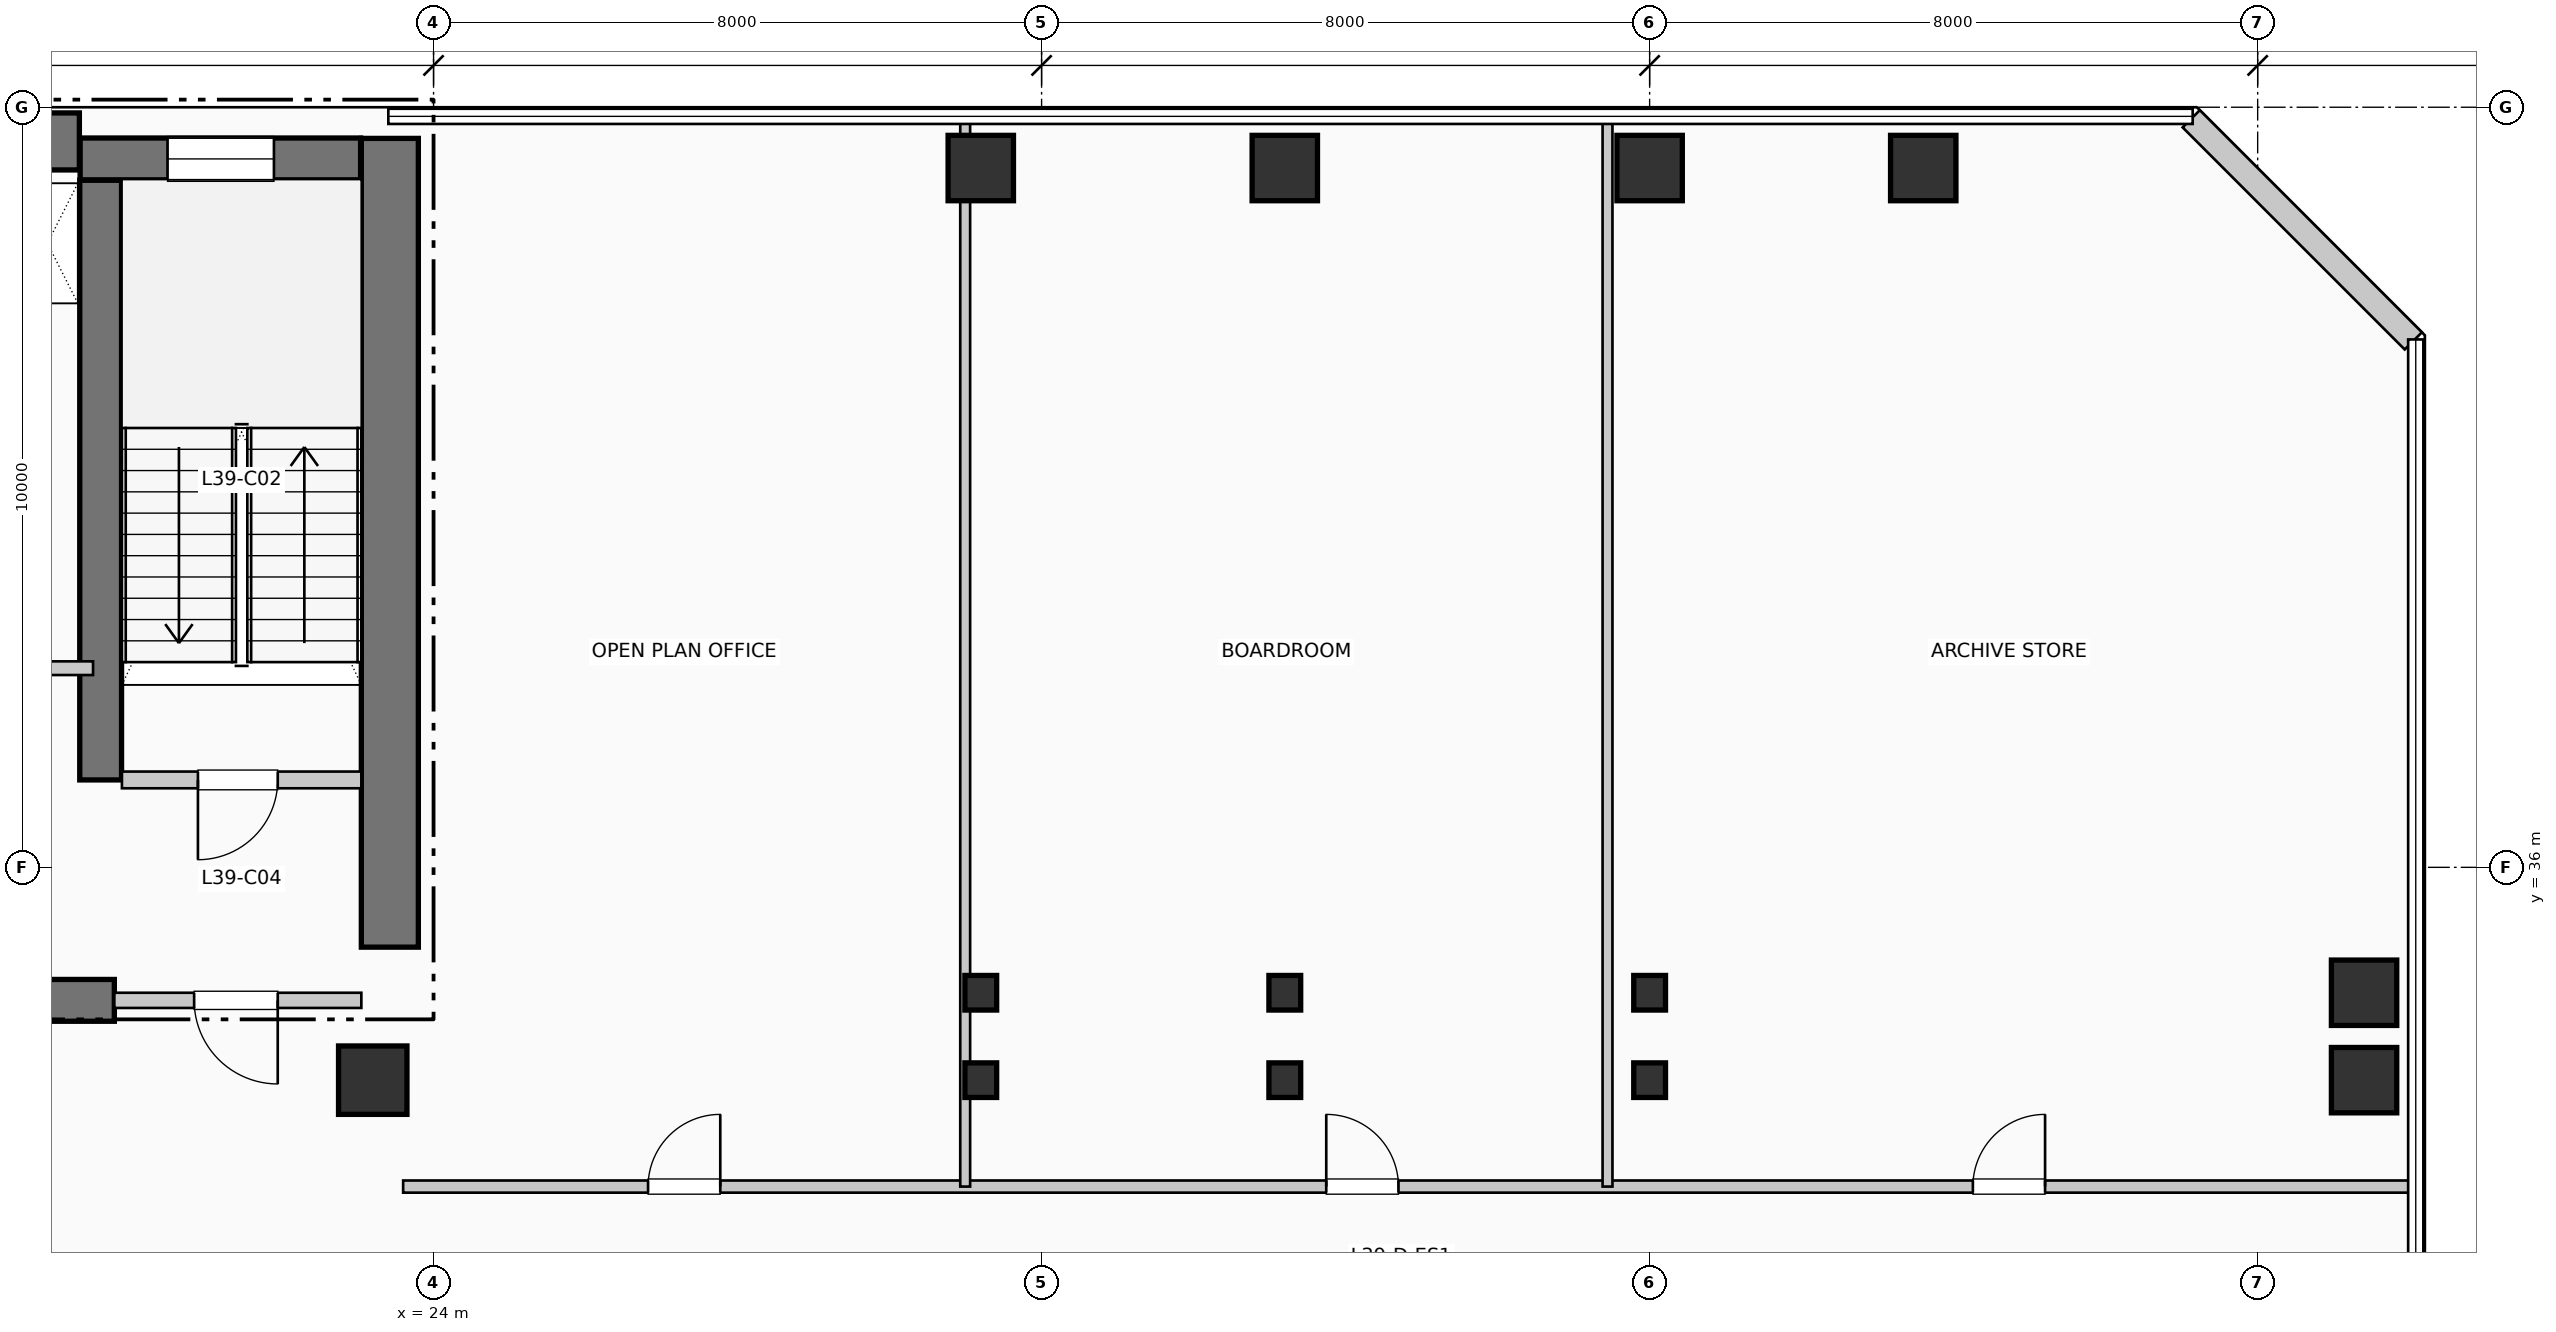
"""IFC4 building model, lengths in metres.
Left out: names, types, materials, properties, quantities, classifications, styles, units other than length and angle.
Written with IfcOpenShell. Run it as: python <this file> out.ifc"""

import sys

from ifc_helpers import new_model, si_unit, direction, frame, frame_2d, origin, origin_2d, place, context, subcontext, project, spatial, rectangle, i_section, extrude, element, fill, save


model = new_model("IFC4")
c1 = context("Model", 3, precision=1e-05, world=origin(), true_north=direction((0.0, 1.0)))
c2 = subcontext(c1, "Body", "Model", "MODEL_VIEW")
j1 = project(units=[si_unit("LENGTHUNIT", "METRE"), si_unit("PLANEANGLEUNIT", "RADIAN")], contexts=[c1])
p1 = place(None, origin())
s1 = spatial("IfcSite", under=j1, at=p1, CompositionType="ELEMENT")
p2 = place(p1, origin())
s2 = spatial("IfcBuilding", under=s1, at=p2, CompositionType="ELEMENT")
p3 = place(p2, frame((0.0, 0.0, 162.69)))
s3 = spatial("IfcBuildingStorey", under=s2, at=p3, CompositionType="ELEMENT", Elevation=162.69)
p4 = place(p3, frame((5.36, 45.55, 0.0), z_axis=(0.0, 0.0, 1.0), x_axis=(1.0, 0.0, 0.0)))
e1 = element("IfcWall", 1, at=p4, inside=s3, PredefinedType="SHEAR", context=c2, shape_type="SweptSolid", body=[
    extrude(rectangle(XDim=13.98, YDim=0.75, at=frame_2d((6.99, 0.0))), origin(), (0.0, 0.0, 1.0), 3.96),
])
p5 = place(p3, frame((23.425, 34.95, 0.0), z_axis=(0.0, 0.0, 1.0), x_axis=(0.0, 1.0, 0.0)))
e2 = element("IfcWall", 2, at=p5, inside=s3, PredefinedType="SHEAR", context=c2, shape_type="SweptSolid", body=[
    extrude(rectangle(XDim=10.64, YDim=0.75, at=frame_2d((5.32, 0.0))), origin(), (0.0, 0.0, 1.0), 3.96),
])
p6 = place(p3, frame((13.68, 34.25, 0.0), z_axis=(0.0, 0.0, 1.0), x_axis=(1.0, 0.0, 0.0)))
e3 = element("IfcWall", 3, at=p6, inside=s3, PredefinedType="SHEAR", context=c2, shape_type="SweptSolid", body=[
    extrude(rectangle(XDim=6.12, YDim=0.55, at=frame_2d((3.06, 0.0))), origin(), (0.0, 0.0, 1.0), 3.96),
])
p7 = place(p3, frame((19.62, 37.15, 0.0), z_axis=(0.0, 0.0, 1.0), x_axis=(0.0, 1.0, 0.0)))
e4 = element("IfcWall", 4, at=p7, inside=s3, PredefinedType="SHEAR", context=c2, shape_type="SweptSolid", body=[
    extrude(rectangle(XDim=7.89, YDim=0.55, at=frame_2d((3.945, 0.0))), origin(), (0.0, 0.0, 1.0), 3.96),
])
p8 = place(p3, frame((19.35, 45.32, 0.0), z_axis=(0.0, 0.0, 1.0), x_axis=(1.0, 0.0, 0.0)))
e5 = element("IfcWall", 5, at=p8, inside=s3, PredefinedType="SHEAR", context=c2, shape_type="SweptSolid", body=[
    extrude(rectangle(XDim=3.69, YDim=0.55, at=frame_2d((1.845, 0.0))), origin(), (0.0, 0.0, 1.0), 3.96),
])
p9 = place(p8, frame((1.15, 0.0, 1.05)))
e6 = element("IfcOpeningElement", 6, at=p9, cuts=e5, PredefinedType="OPENING", context=c2, shape_type="SweptSolid", body=[
    extrude(rectangle(XDim=1.4, YDim=1.8, at=frame_2d((0.7, 0.9))), frame((0.0, 0.285, 0.0), z_axis=(0.0, -1.0, 0.0), x_axis=(1.0, 0.0, 0.0)), (0.0, 0.0, 1.0), 0.57),
])
p10 = place(p3, frame((23.2, 33.2, 0.0), z_axis=(0.0, 0.0, 1.0), x_axis=(1.0, 0.0, 0.0)))
e7 = element("IfcColumn", 7, at=p10, inside=s3, PredefinedType="COLUMN", context=c2, shape_type="SweptSolid", body=[
    extrude(rectangle(XDim=0.9, YDim=0.9, at=origin_2d()), origin(), (0.0, 0.0, 1.0), 3.96),
])
for number, where, z_axis, x_axis in (
    (8, (31.2, 33.2, 0.0), (0.0, 0.0, 1.0), (1.0, 0.0, 0.0)),
    (9, (31.2, 34.35, 0.0), (0.0, 0.0, 1.0), (1.0, 0.0, 0.0)),
):
    element("IfcColumn", number, at=place(p3, frame(where, z_axis=z_axis, x_axis=x_axis)), inside=s3, PredefinedType="COLUMN", context=c2, shape_type="SweptSolid", body=[
        extrude(i_section(OverallWidth=0.418, OverallDepth=0.455, WebThickness=0.032, FlangeThickness=0.051, at=origin_2d()), origin(), (0.0, 0.0, 1.0), 3.96),
    ])
p11 = place(p3, frame((31.2, 45.2, 0.0), z_axis=(0.0, 0.0, 1.0), x_axis=(1.0, 0.0, 0.0)))
e10 = element("IfcColumn", 10, at=p11, inside=s3, PredefinedType="COLUMN", context=c2, shape_type="SweptSolid", body=[
    extrude(rectangle(XDim=0.86, YDim=0.86, at=origin_2d()), origin(), (0.0, 0.0, 1.0), 3.96),
])
for number, where, z_axis, x_axis in (
    (11, (35.2, 33.2, 0.0), (0.0, 0.0, 1.0), (1.0, 0.0, 0.0)),
    (12, (35.2, 34.35, 0.0), (0.0, 0.0, 1.0), (1.0, 0.0, 0.0)),
):
    element("IfcColumn", number, at=place(p3, frame(where, z_axis=z_axis, x_axis=x_axis)), inside=s3, PredefinedType="COLUMN", context=c2, shape_type="SweptSolid", body=[
        extrude(i_section(OverallWidth=0.418, OverallDepth=0.455, WebThickness=0.032, FlangeThickness=0.051, at=origin_2d()), origin(), (0.0, 0.0, 1.0), 3.96),
    ])
p12 = place(p3, frame((35.2, 45.2, 0.0), z_axis=(0.0, 0.0, 1.0), x_axis=(1.0, 0.0, 0.0)))
e13 = element("IfcColumn", 13, at=p12, inside=s3, PredefinedType="COLUMN", context=c2, shape_type="SweptSolid", body=[
    extrude(rectangle(XDim=0.86, YDim=0.86, at=origin_2d()), origin(), (0.0, 0.0, 1.0), 3.96),
])
for number, where, z_axis, x_axis in (
    (14, (40.0, 33.2, 0.0), (0.0, 0.0, 1.0), (1.0, 0.0, 0.0)),
    (15, (40.0, 34.35, 0.0), (0.0, 0.0, 1.0), (1.0, 0.0, 0.0)),
):
    element("IfcColumn", number, at=place(p3, frame(where, z_axis=z_axis, x_axis=x_axis)), inside=s3, PredefinedType="COLUMN", context=c2, shape_type="SweptSolid", body=[
        extrude(i_section(OverallWidth=0.418, OverallDepth=0.455, WebThickness=0.032, FlangeThickness=0.051, at=origin_2d()), origin(), (0.0, 0.0, 1.0), 3.96),
    ])
for number, where, z_axis, x_axis in (
    (16, (40.0, 45.2, 0.0), (0.0, 0.0, 1.0), (1.0, 0.0, 0.0)),
    (17, (43.6, 45.2, 0.0), (0.0, 0.0, 1.0), (1.0, 0.0, 0.0)),
    (18, (49.4, 33.2, 0.0), (0.0, 0.0, 1.0), (1.0, 0.0, 0.0)),
    (19, (49.4, 34.35, 0.0), (0.0, 0.0, 1.0), (1.0, 0.0, 0.0)),
):
    element("IfcColumn", number, at=place(p3, frame(where, z_axis=z_axis, x_axis=x_axis)), inside=s3, PredefinedType="COLUMN", context=c2, shape_type="SweptSolid", body=[
        extrude(rectangle(XDim=0.86, YDim=0.86, at=origin_2d()), origin(), (0.0, 0.0, 1.0), 3.96),
    ])
p13 = place(p3, frame((50.048, 42.926, 0.0), z_axis=(0.0, 0.0, 1.0), x_axis=(-0.707136318428, 0.707077242712, 0.0)))
e20 = element("IfcWall", 20, at=p13, inside=s3, PredefinedType="SOLIDWALL", context=c2, shape_type="SweptSolid", body=[
    extrude(rectangle(XDim=4.133, YDim=0.32, at=frame_2d((2.066, 0.0))), origin(), (0.0, 0.0, 1.0), 3.71),
])
p14 = place(p3, frame((19.9, 37.15, 0.0), z_axis=(0.0, 0.0, 1.0), x_axis=(1.0, 0.0, 0.0)))
e21 = element("IfcWall", 21, at=p14, inside=s3, PredefinedType="PARTITIONING", context=c2, shape_type="SweptSolid", body=[
    extrude(rectangle(XDim=3.15, YDim=0.22, at=frame_2d((1.575, 0.0))), origin(), (0.0, 0.0, 1.0), 3.71),
])
p15 = place(p14, frame((2.05, 0.0, 0.0), z_axis=(0.0, 0.0, 1.0), x_axis=(-1.0, 0.0, 0.0)))
e22 = element("IfcOpeningElement", 22, at=p15, cuts=e21, PredefinedType="OPENING", context=c2, shape_type="SweptSolid", body=[
    extrude(rectangle(XDim=1.05, YDim=2.15, at=frame_2d((0.525, 1.075))), frame((0.0, 0.12, 0.0), z_axis=(0.0, -1.0, 0.0), x_axis=(1.0, 0.0, 0.0)), (0.0, 0.0, 1.0), 0.24),
])
p16 = place(p3, frame((19.8, 34.25, 0.0), z_axis=(0.0, 0.0, 1.0), x_axis=(1.0, 0.0, 0.0)))
e23 = element("IfcWall", 23, at=p16, inside=s3, PredefinedType="PARTITIONING", context=c2, shape_type="SweptSolid", body=[
    extrude(rectangle(XDim=3.25, YDim=0.2, at=frame_2d((1.625, 0.0))), origin(), (0.0, 0.0, 1.0), 3.71),
])
p17 = place(p16, frame((2.15, 0.0, 0.0), z_axis=(0.0, 0.0, 1.0), x_axis=(-1.0, 0.0, 0.0)))
e24 = element("IfcOpeningElement", 24, at=p17, cuts=e23, PredefinedType="OPENING", context=c2, shape_type="SweptSolid", body=[
    extrude(rectangle(XDim=1.1, YDim=2.15, at=frame_2d((0.55, 1.075))), frame((0.0, 0.11, 0.0), z_axis=(0.0, -1.0, 0.0), x_axis=(1.0, 0.0, 0.0)), (0.0, 0.0, 1.0), 0.22),
])
p18 = place(p3, frame((17.68, 38.62, 0.0), z_axis=(0.0, 0.0, 1.0), x_axis=(1.0, 0.0, 0.0)))
e25 = element("IfcWall", 25, at=p18, inside=s3, PredefinedType="PARTITIONING", context=c2, shape_type="SweptSolid", body=[
    extrude(rectangle(XDim=1.84, YDim=0.18, at=frame_2d((0.92, 0.0))), origin(), (0.0, 0.0, 1.0), 3.71),
])
p19 = place(p18, frame((0.24, 0.0, 0.0)))
e26 = element("IfcOpeningElement", 26, at=p19, cuts=e25, PredefinedType="OPENING", context=c2, shape_type="SweptSolid", body=[
    extrude(rectangle(XDim=0.92, YDim=2.1, at=frame_2d((0.46, 1.05))), frame((0.0, 0.1, 0.0), z_axis=(0.0, -1.0, 0.0), x_axis=(1.0, 0.0, 0.0)), (0.0, 0.0, 1.0), 0.2),
])
p20 = place(p3, frame((23.6, 31.8, 0.0), z_axis=(0.0, 0.0, 1.0), x_axis=(1.0, 0.0, 0.0)))
e27 = element("IfcWall", 27, at=p20, inside=s3, PredefinedType="PARTITIONING", context=c2, shape_type="SweptSolid", body=[
    extrude(rectangle(XDim=26.41, YDim=0.16, at=frame_2d((13.205, 0.0))), origin(), (0.0, 0.0, 1.0), 3.71),
])
p21 = place(p20, frame((3.222, 0.0, 0.0)))
e28 = element("IfcOpeningElement", 28, at=p21, cuts=e27, PredefinedType="OPENING", context=c2, shape_type="SweptSolid", body=[
    extrude(rectangle(XDim=0.95, YDim=2.15, at=frame_2d((0.475, 1.075))), frame((0.0, 0.09, 0.0), z_axis=(0.0, -1.0, 0.0), x_axis=(1.0, 0.0, 0.0)), (0.0, 0.0, 1.0), 0.18),
])
p22 = place(p20, frame((12.146, 0.0, 0.0)))
e29 = element("IfcOpeningElement", 29, at=p22, cuts=e27, PredefinedType="OPENING", context=c2, shape_type="SweptSolid", body=[
    extrude(rectangle(XDim=0.95, YDim=2.15, at=frame_2d((0.475, 1.075))), frame((0.0, 0.09, 0.0), z_axis=(0.0, -1.0, 0.0), x_axis=(1.0, 0.0, 0.0)), (0.0, 0.0, 1.0), 0.18),
])
p23 = place(p20, frame((20.653, 0.0, 0.0)))
e30 = element("IfcOpeningElement", 30, at=p23, cuts=e27, PredefinedType="OPENING", context=c2, shape_type="SweptSolid", body=[
    extrude(rectangle(XDim=0.95, YDim=2.15, at=frame_2d((0.475, 1.075))), frame((0.0, 0.09, 0.0), z_axis=(0.0, -1.0, 0.0), x_axis=(1.0, 0.0, 0.0)), (0.0, 0.0, 1.0), 0.18),
])
p24 = place(p3, frame((30.995, 31.8, 0.0), z_axis=(0.0, 0.0, 1.0), x_axis=(0.0, 1.0, 0.0)))
e31 = element("IfcWall", 31, at=p24, inside=s3, PredefinedType="PARTITIONING", context=c2, shape_type="SweptSolid", body=[
    extrude(rectangle(XDim=14.01, YDim=0.13, at=frame_2d((7.005, 0.0))), origin(), (0.0, 0.0, 1.0), 3.045),
])
p25 = place(p3, frame((39.446, 31.8, 0.0), z_axis=(0.0, 0.0, 1.0), x_axis=(0.0, 1.0, 0.0)))
e32 = element("IfcWall", 32, at=p25, inside=s3, PredefinedType="PARTITIONING", context=c2, shape_type="SweptSolid", body=[
    extrude(rectangle(XDim=14.01, YDim=0.13, at=frame_2d((7.005, 0.0))), origin(), (0.0, 0.0, 1.0), 3.71),
])
p26 = place(p9, origin())
e33 = element("IfcWindow", 33, at=p26, inside=s3, PartitioningType="SINGLE_PANEL", PredefinedType="WINDOW", context=c2, shape_type="SweptSolid", body=[
    extrude(rectangle(XDim=1.4, YDim=1.8, at=frame_2d((0.7, 0.9))), frame((0.0, 0.03, 0.0), z_axis=(0.0, -1.0, 0.0), x_axis=(1.0, 0.0, 0.0)), (0.0, 0.0, 1.0), 0.06),
])
fill(e6, e33)
p27 = place(p15, origin())
e34 = element("IfcDoor", 34, at=p27, inside=s3, OperationType="SINGLE_SWING_LEFT", PredefinedType="DOOR", context=c2, shape_type="SweptSolid", body=[
    extrude(rectangle(XDim=1.05, YDim=2.15, at=frame_2d((0.525, 1.075))), frame((0.0, 0.025, 0.0), z_axis=(0.0, -1.0, 0.0), x_axis=(1.0, 0.0, 0.0)), (0.0, 0.0, 1.0), 0.05),
])
fill(e22, e34)
p28 = place(p17, origin())
e35 = element("IfcDoor", 35, at=p28, inside=s3, OperationType="SINGLE_SWING_RIGHT", PredefinedType="DOOR", context=c2, shape_type="SweptSolid", body=[
    extrude(rectangle(XDim=1.1, YDim=2.15, at=frame_2d((0.55, 1.075))), frame((0.0, 0.025, 0.0), z_axis=(0.0, -1.0, 0.0), x_axis=(1.0, 0.0, 0.0)), (0.0, 0.0, 1.0), 0.05),
])
fill(e24, e35)
p29 = place(p21, origin())
e36 = element("IfcDoor", 36, at=p29, inside=s3, OperationType="SINGLE_SWING_RIGHT", PredefinedType="DOOR", context=c2, shape_type="SweptSolid", body=[
    extrude(rectangle(XDim=0.95, YDim=2.15, at=frame_2d((0.475, 1.075))), frame((0.0, 0.025, 0.0), z_axis=(0.0, -1.0, 0.0), x_axis=(1.0, 0.0, 0.0)), (0.0, 0.0, 1.0), 0.05),
])
fill(e28, e36)
p30 = place(p22, origin())
e37 = element("IfcDoor", 37, at=p30, inside=s3, OperationType="SINGLE_SWING_LEFT", PredefinedType="DOOR", context=c2, shape_type="SweptSolid", body=[
    extrude(rectangle(XDim=0.95, YDim=2.15, at=frame_2d((0.475, 1.075))), frame((0.0, 0.025, 0.0), z_axis=(0.0, -1.0, 0.0), x_axis=(1.0, 0.0, 0.0)), (0.0, 0.0, 1.0), 0.05),
])
fill(e29, e37)
p31 = place(p23, origin())
e38 = element("IfcDoor", 38, at=p31, inside=s3, OperationType="SINGLE_SWING_RIGHT", PredefinedType="DOOR", context=c2, shape_type="SweptSolid", body=[
    extrude(rectangle(XDim=0.95, YDim=2.15, at=frame_2d((0.475, 1.075))), frame((0.0, 0.025, 0.0), z_axis=(0.0, -1.0, 0.0), x_axis=(1.0, 0.0, 0.0)), (0.0, 0.0, 1.0), 0.05),
])
fill(e30, e38)
save(model, sys.argv[1])
